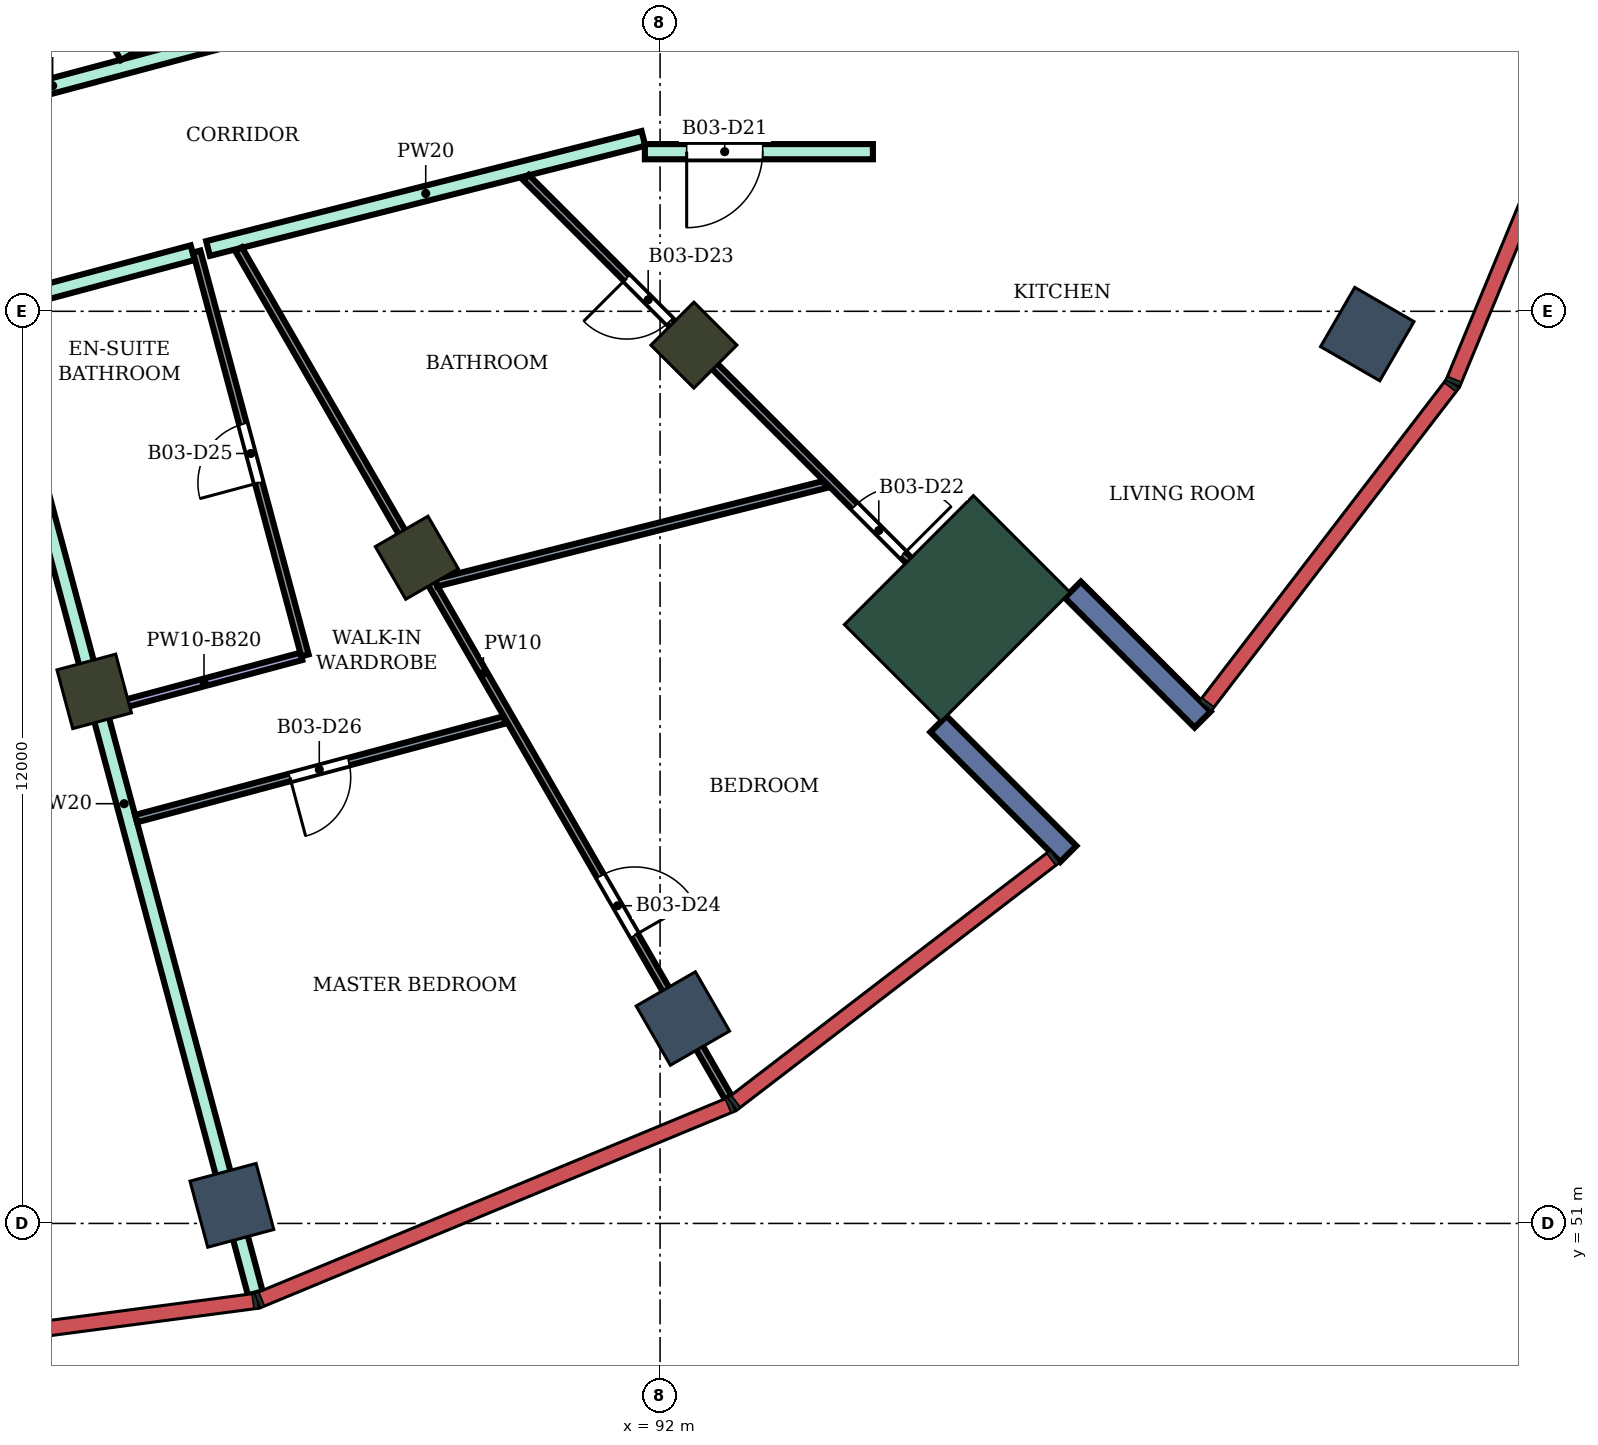
"""IFC4 building model, lengths in metres.
Left out: names, types, materials, properties, quantities, classifications, styles, units other than length and angle.
Written with IfcOpenShell. Run it as: python <this file> out.ifc"""

import sys

from ifc_helpers import new_model, si_unit, direction, frame, frame_2d, origin, origin_2d, place, context, subcontext, project, spatial, rectangle, extrude, element, fill, save


model = new_model("IFC4")
c1 = context("Model", 3, precision=1e-05, world=origin(), true_north=direction((0.0, 1.0)))
c2 = subcontext(c1, "Body", "Model", "MODEL_VIEW")
j1 = project(units=[si_unit("LENGTHUNIT", "METRE"), si_unit("PLANEANGLEUNIT", "RADIAN")], contexts=[c1])
p1 = place(None, origin())
s1 = spatial("IfcSite", under=j1, at=p1, CompositionType="ELEMENT")
p2 = place(p1, origin())
s2 = spatial("IfcBuilding", under=s1, at=p2, CompositionType="ELEMENT")
p3 = place(p2, frame((0.0, 0.0, 237.3)))
s3 = spatial("IfcBuildingStorey", under=s2, at=p3, CompositionType="ELEMENT", Elevation=237.3)
for number, where, z_axis, x_axis in (
    (1, (86.367, 51.238, 0.0), (0.0, 0.0, 1.0), (0.259, -0.966, 0.0)),
    (2, (92.3, 53.696, 0.0), (0.0, 0.0, 1.0), (0.5, -0.866, 0.0)),
    (3, (101.304, 62.7, 0.0), (0.0, 0.0, 1.0), (0.866, -0.5, 0.0)),
):
    element("IfcColumn", number, at=place(p3, frame(where, z_axis=z_axis, x_axis=x_axis)), inside=s3, PredefinedType="COLUMN", context=c2, shape_type="SweptSolid", body=[
        extrude(rectangle(XDim=0.9, YDim=0.9, at=origin_2d()), origin(), (0.0, 0.0, 1.0), 4.2),
    ])
for number, where, z_axis, x_axis in (
    (4, (84.555, 58.0, 0.0), (0.0, 0.0, 1.0), (0.259, -0.966, 0.0)),
    (5, (88.8, 59.758, 0.0), (0.0, 0.0, 1.0), (0.5, -0.866, 0.0)),
    (6, (92.445, 62.555, 0.0), (0.0, 0.0, 1.0), (0.707, -0.707, 0.0)),
):
    element("IfcColumn", number, at=place(p3, frame(where, z_axis=z_axis, x_axis=x_axis)), inside=s3, PredefinedType="COLUMN", context=c2, shape_type="SweptSolid", body=[
        extrude(rectangle(XDim=0.8, YDim=0.8, at=origin_2d()), origin(), (0.0, 0.0, 1.0), 4.2),
    ])
p4 = place(p3, frame((95.91, 59.09, 0.0), z_axis=(0.0, 0.0, 1.0), x_axis=(0.707106781187, -0.707106781187, 0.0)))
e7 = element("IfcColumn", 7, at=p4, inside=s3, PredefinedType="COLUMN", context=c2, shape_type="SweptSolid", body=[
    extrude(rectangle(XDim=1.8, YDim=2.4, at=origin_2d()), origin(), (0.0, 0.0, 1.0), 4.2),
])
for number, where, z_axis, x_axis in (
    (8, (95.662, 57.57, 0.0), (0.0, 0.0, 1.0), (0.707, -0.707, 0.0)),
    (9, (97.43, 59.338, 0.0), (0.0, 0.0, 1.0), (0.707, -0.707, 0.0)),
):
    element("IfcWall", number, at=place(p3, frame(where, z_axis=z_axis, x_axis=x_axis)), inside=s3, PredefinedType="NOTDEFINED", context=c2, shape_type="SweptSolid", body=[
        extrude(rectangle(XDim=2.416, YDim=0.3, at=frame_2d((1.208, 0.0))), origin(), (0.0, 0.0, 1.0), 4.2),
    ])
p5 = place(p3, frame((80.125, 64.932, 0.0), z_axis=(0.0, 0.0, 1.0), x_axis=(0.966236955806, 0.257655089674, 0.0)))
e10 = element("IfcWall", 10, at=p5, inside=s3, PredefinedType="PARTITIONING", context=c2, shape_type="SweptSolid", body=[
    extrude(rectangle(XDim=8.039, YDim=0.2, at=frame_2d((4.02, 0.0))), origin(), (0.0, 0.0, 1.0), 3.75),
])
p6 = place(p5, frame((6.298, 0.0, 0.0)))
e11 = element("IfcOpeningElement", 11, at=p6, cuts=e10, PredefinedType="OPENING", context=c2, shape_type="SweptSolid", body=[
    extrude(rectangle(XDim=0.9, YDim=2.1, at=frame_2d((0.45, 1.05))), frame((0.0, 0.11, 0.0), z_axis=(0.0, -1.0, 0.0), x_axis=(1.0, 0.0, 0.0)), (0.0, 0.0, 1.0), 0.22),
])
p7 = place(p5, frame((2.045, 0.0, 0.0)))
e12 = element("IfcOpeningElement", 12, at=p7, cuts=e10, PredefinedType="OPENING", context=c2, shape_type="SweptSolid", body=[
    extrude(rectangle(XDim=0.9, YDim=2.1, at=frame_2d((0.45, 1.05))), frame((0.0, 0.11, 0.0), z_axis=(0.0, -1.0, 0.0), x_axis=(1.0, 0.0, 0.0)), (0.0, 0.0, 1.0), 0.22),
])
p8 = place(p3, frame((80.048, 62.217, 0.0), z_axis=(0.0, 0.0, 1.0), x_axis=(0.965941520544, 0.258760466242, 0.0)))
e13 = element("IfcWall", 13, at=p8, inside=s3, PredefinedType="PARTITIONING", context=c2, shape_type="SweptSolid", body=[
    extrude(rectangle(XDim=6.006, YDim=0.2, at=frame_2d((3.003, 0.0))), origin(), (0.0, 0.0, 1.0), 3.75),
])
p9 = place(p8, frame((0.5, 0.0, 0.0)))
e14 = element("IfcOpeningElement", 14, at=p9, cuts=e13, PredefinedType="OPENING", context=c2, shape_type="SweptSolid", body=[
    extrude(rectangle(XDim=1.0, YDim=2.1, at=frame_2d((0.5, 1.05))), frame((0.0, 0.11, 0.0), z_axis=(0.0, -1.0, 0.0), x_axis=(1.0, 0.0, 0.0)), (0.0, 0.0, 1.0), 0.22),
])
p10 = place(p3, frame((83.224, 62.964, 0.0), z_axis=(0.0, 0.0, 1.0), x_axis=(0.258742489642, -0.965946336012, 0.0)))
e15 = element("IfcWall", 15, at=p10, inside=s3, PredefinedType="PARTITIONING", context=c2, shape_type="SweptSolid", body=[
    extrude(rectangle(XDim=13.338, YDim=0.2, at=frame_2d((6.669, 0.0))), origin(), (0.0, 0.0, 1.0), 3.75),
])
p11 = place(p3, frame((83.85, 68.333, 0.0), z_axis=(0.0, 0.0, 1.0), x_axis=(0.500080019051, -0.865979199835, 0.0)))
e16 = element("IfcWall", 16, at=p11, inside=s3, PredefinedType="PARTITIONING", context=c2, shape_type="SweptSolid", body=[
    extrude(rectangle(XDim=2.285, YDim=0.2, at=frame_2d((1.143, 0.0))), origin(), (0.0, 0.0, 1.0), 3.75),
])
p12 = place(p3, frame((86.053, 63.826, 0.0), z_axis=(0.0, 0.0, 1.0), x_axis=(0.969490004987, 0.245130843083, 0.0)))
e17 = element("IfcWall", 17, at=p12, inside=s3, PredefinedType="PARTITIONING", context=c2, shape_type="SweptSolid", body=[
    extrude(rectangle(XDim=5.908, YDim=0.2, at=frame_2d((2.954, 0.0))), origin(), (0.0, 0.0, 1.0), 3.75),
])
p13 = place(p3, frame((91.8, 65.1, 0.0), z_axis=(0.0, 0.0, 1.0), x_axis=(1.0, 0.0, 0.0)))
e18 = element("IfcWall", 18, at=p13, inside=s3, PredefinedType="PARTITIONING", context=c2, shape_type="SweptSolid", body=[
    extrude(rectangle(XDim=3.0, YDim=0.2, at=frame_2d((1.5, 0.0))), origin(), (0.0, 0.0, 1.0), 3.75),
])
p14 = place(p13, frame((0.55, 0.0, 0.0)))
e19 = element("IfcOpeningElement", 19, at=p14, cuts=e18, PredefinedType="OPENING", context=c2, shape_type="SweptSolid", body=[
    extrude(rectangle(XDim=1.0, YDim=2.1, at=frame_2d((0.5, 1.05))), frame((0.0, 0.11, 0.0), z_axis=(0.0, -1.0, 0.0), x_axis=(1.0, 0.0, 0.0)), (0.0, 0.0, 1.0), 0.22),
])
p15 = place(p3, frame((84.719, 57.774, 0.0), z_axis=(0.0, 0.0, 1.0), x_axis=(0.965902408875, 0.258906424273, 0.0)))
e20 = element("IfcWall", 20, at=p15, inside=s3, PredefinedType="PARTITIONING", context=c2, shape_type="SweptSolid", body=[
    extrude(rectangle(XDim=2.651, YDim=0.1, at=frame_2d((1.325, 0.0))), origin(), (0.0, 0.0, 1.0), 3.38),
])
p16 = place(p3, frame((85.108, 56.326, 0.0), z_axis=(0.0, 0.0, 1.0), x_axis=(0.965911122806, 0.258873913014, 0.0)))
e21 = element("IfcWall", 21, at=p16, inside=s3, PredefinedType="PARTITIONING", context=c2, shape_type="SweptSolid", body=[
    extrude(rectangle(XDim=5.017, YDim=0.1, at=frame_2d((2.509, 0.0))), origin(), (0.0, 0.0, 1.0), 3.75),
])
p17 = place(p16, frame((2.094, 0.0, 0.0)))
e22 = element("IfcOpeningElement", 22, at=p17, cuts=e21, PredefinedType="OPENING", context=c2, shape_type="SweptSolid", body=[
    extrude(rectangle(XDim=0.8, YDim=2.1, at=frame_2d((0.4, 1.05))), frame((0.0, 0.06, 0.0), z_axis=(0.0, -1.0, 0.0), x_axis=(1.0, 0.0, 0.0)), (0.0, 0.0, 1.0), 0.12),
])
p18 = place(p3, frame((85.904, 63.786, 0.0), z_axis=(0.0, 0.0, 1.0), x_axis=(0.258855888267, -0.96591595344, 0.0)))
e23 = element("IfcWall", 23, at=p18, inside=s3, PredefinedType="PARTITIONING", context=c2, shape_type="SweptSolid", body=[
    extrude(rectangle(XDim=5.5, YDim=0.1, at=frame_2d((2.75, 0.0))), origin(), (0.0, 0.0, 1.0), 3.75),
])
p19 = place(p18, frame((2.35, 0.0, 0.0)))
e24 = element("IfcOpeningElement", 24, at=p19, cuts=e23, PredefinedType="OPENING", context=c2, shape_type="SweptSolid", body=[
    extrude(rectangle(XDim=0.8, YDim=2.1, at=frame_2d((0.4, 1.05))), frame((0.0, 0.06, 0.0), z_axis=(0.0, -1.0, 0.0), x_axis=(1.0, 0.0, 0.0)), (0.0, 0.0, 1.0), 0.12),
])
p20 = place(p3, frame((86.454, 63.818, 0.0), z_axis=(0.0, 0.0, 1.0), x_axis=(0.499914882008, -0.866074541103, 0.0)))
e25 = element("IfcWall", 25, at=p20, inside=s3, PredefinedType="PARTITIONING", context=c2, shape_type="SweptSolid", body=[
    extrude(rectangle(XDim=12.886, YDim=0.1, at=frame_2d((6.443, 0.0))), origin(), (0.0, 0.0, 1.0), 3.75),
])
p21 = place(p20, frame((9.524, 0.0, 0.0)))
e26 = element("IfcOpeningElement", 26, at=p21, cuts=e25, PredefinedType="OPENING", context=c2, shape_type="SweptSolid", body=[
    extrude(rectangle(XDim=0.9, YDim=2.1, at=frame_2d((0.45, 1.05))), frame((0.0, 0.06, 0.0), z_axis=(0.0, -1.0, 0.0), x_axis=(1.0, 0.0, 0.0)), (0.0, 0.0, 1.0), 0.12),
])
p22 = place(p3, frame((89.058, 59.429, 0.0), z_axis=(0.0, 0.0, 1.0), x_axis=(0.96946321375, 0.2452367778, 0.0)))
e27 = element("IfcWall", 27, at=p22, inside=s3, PredefinedType="PARTITIONING", context=c2, shape_type="SweptSolid", body=[
    extrude(rectangle(XDim=5.272, YDim=0.1, at=frame_2d((2.636, 0.0))), origin(), (0.0, 0.0, 1.0), 3.75),
])
p23 = place(p3, frame((90.237, 64.759, 0.0), z_axis=(0.0, 0.0, 1.0), x_axis=(0.706952774706, -0.707260754132, 0.0)))
e28 = element("IfcWall", 28, at=p23, inside=s3, PredefinedType="PARTITIONING", context=c2, shape_type="SweptSolid", body=[
    extrude(rectangle(XDim=8.72, YDim=0.1, at=frame_2d((4.36, 0.0))), origin(), (0.0, 0.0, 1.0), 3.75),
])
p24 = place(p23, frame((6.114, 0.0, 0.0)))
e29 = element("IfcOpeningElement", 29, at=p24, cuts=e28, PredefinedType="OPENING", context=c2, shape_type="SweptSolid", body=[
    extrude(rectangle(XDim=0.9, YDim=2.1, at=frame_2d((0.45, 1.05))), frame((0.0, 0.06, 0.0), z_axis=(0.0, -1.0, 0.0), x_axis=(1.0, 0.0, 0.0)), (0.0, 0.0, 1.0), 0.12),
])
p25 = place(p23, frame((1.872, 0.0, 0.0)))
e30 = element("IfcOpeningElement", 30, at=p25, cuts=e28, PredefinedType="OPENING", context=c2, shape_type="SweptSolid", body=[
    extrude(rectangle(XDim=0.8, YDim=2.1, at=frame_2d((0.4, 1.05))), frame((0.0, 0.06, 0.0), z_axis=(0.0, -1.0, 0.0), x_axis=(1.0, 0.0, 0.0)), (0.0, 0.0, 1.0), 0.12),
])
p26 = place(p14, frame((1.0, 0.0, 0.0), z_axis=(0.0, 0.0, 1.0), x_axis=(-1.0, 0.0, 0.0)))
e31 = element("IfcDoor", 31, at=p26, inside=s3, OperationType="SINGLE_SWING_RIGHT", PredefinedType="DOOR", context=c2, shape_type="SweptSolid", body=[
    extrude(rectangle(XDim=1.0, YDim=2.1, at=frame_2d((0.5, 1.05))), frame((0.0, 0.025, 0.0), z_axis=(0.0, -1.0, 0.0), x_axis=(1.0, 0.0, 0.0)), (0.0, 0.0, 1.0), 0.05),
])
fill(e19, e31)
p27 = place(p24, origin())
e32 = element("IfcDoor", 32, at=p27, inside=s3, OperationType="SINGLE_SWING_RIGHT", PredefinedType="DOOR", context=c2, shape_type="SweptSolid", body=[
    extrude(rectangle(XDim=0.9, YDim=2.1, at=frame_2d((0.45, 1.05))), frame((0.0, 0.025, 0.0), z_axis=(0.0, -1.0, 0.0), x_axis=(1.0, 0.0, 0.0)), (0.0, 0.0, 1.0), 0.05),
])
fill(e29, e32)
p28 = place(p25, frame((0.8, 0.0, 0.0), z_axis=(0.0, 0.0, 1.0), x_axis=(-1.0, 0.0, 0.0)))
e33 = element("IfcDoor", 33, at=p28, inside=s3, OperationType="SINGLE_SWING_RIGHT", PredefinedType="DOOR", context=c2, shape_type="SweptSolid", body=[
    extrude(rectangle(XDim=0.8, YDim=2.1, at=frame_2d((0.4, 1.05))), frame((0.0, 0.025, 0.0), z_axis=(0.0, -1.0, 0.0), x_axis=(1.0, 0.0, 0.0)), (0.0, 0.0, 1.0), 0.05),
])
fill(e30, e33)
p29 = place(p21, origin())
e34 = element("IfcDoor", 34, at=p29, inside=s3, OperationType="SINGLE_SWING_RIGHT", PredefinedType="DOOR", context=c2, shape_type="SweptSolid", body=[
    extrude(rectangle(XDim=0.9, YDim=2.1, at=frame_2d((0.45, 1.05))), frame((0.0, 0.025, 0.0), z_axis=(0.0, -1.0, 0.0), x_axis=(1.0, 0.0, 0.0)), (0.0, 0.0, 1.0), 0.05),
])
fill(e26, e34)
p30 = place(p19, frame((0.8, 0.0, 0.0), z_axis=(0.0, 0.0, 1.0), x_axis=(-1.0, 0.0, 0.0)))
e35 = element("IfcDoor", 35, at=p30, inside=s3, OperationType="SINGLE_SWING_LEFT", PredefinedType="DOOR", context=c2, shape_type="SweptSolid", body=[
    extrude(rectangle(XDim=0.8, YDim=2.1, at=frame_2d((0.4, 1.05))), frame((0.0, 0.025, 0.0), z_axis=(0.0, -1.0, 0.0), x_axis=(1.0, 0.0, 0.0)), (0.0, 0.0, 1.0), 0.05),
])
fill(e24, e35)
p31 = place(p17, frame((0.8, 0.0, 0.0), z_axis=(0.0, 0.0, 1.0), x_axis=(-1.0, 0.0, 0.0)))
e36 = element("IfcDoor", 36, at=p31, inside=s3, OperationType="SINGLE_SWING_RIGHT", PredefinedType="DOOR", context=c2, shape_type="SweptSolid", body=[
    extrude(rectangle(XDim=0.8, YDim=2.1, at=frame_2d((0.4, 1.05))), frame((0.0, 0.025, 0.0), z_axis=(0.0, -1.0, 0.0), x_axis=(1.0, 0.0, 0.0)), (0.0, 0.0, 1.0), 0.05),
])
fill(e22, e36)
save(model, sys.argv[1])
